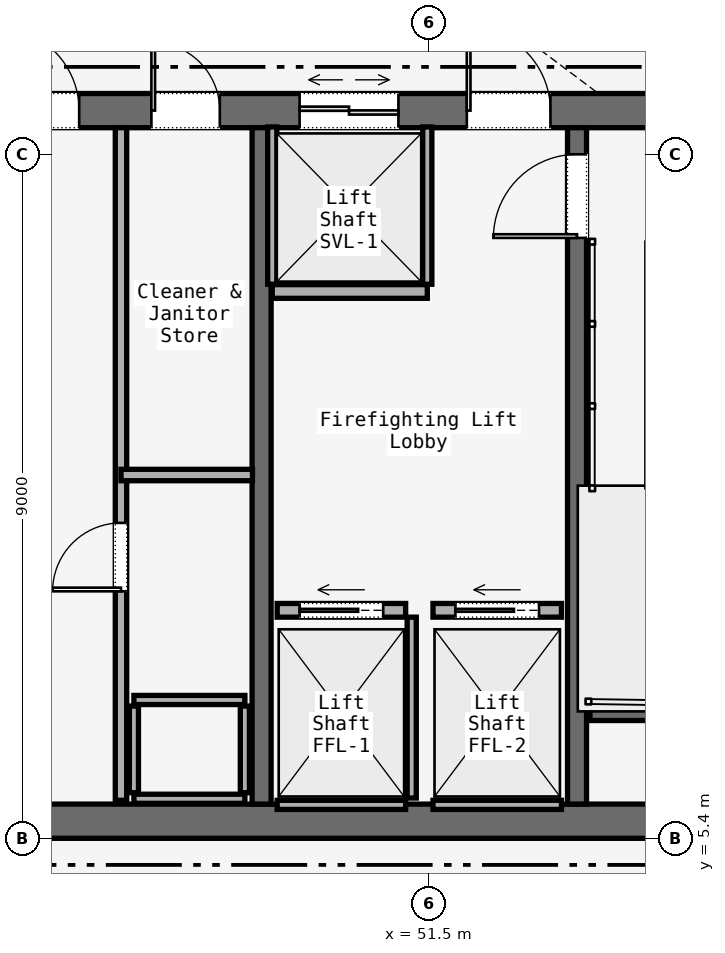
"""IFC4 building model, lengths in metres.
Left out: names, types, materials, properties, quantities, classifications, styles, units other than length and angle.
Written with IfcOpenShell. Run it as: python <this file> out.ifc"""

import sys

from ifc_helpers import new_model, si_unit, direction, frame, frame_2d, origin, place, context, subcontext, project, spatial, rectangle, extrude, element, fill, save


model = new_model("IFC4")
c1 = context("Model", 3, precision=1e-05, world=origin(), true_north=direction((0.0, 1.0)))
c2 = subcontext(c1, "Body", "Model", "MODEL_VIEW")
j1 = project(units=[si_unit("LENGTHUNIT", "METRE"), si_unit("PLANEANGLEUNIT", "RADIAN")], contexts=[c1])
p1 = place(None, origin())
s1 = spatial("IfcSite", under=j1, at=p1, CompositionType="ELEMENT")
p2 = place(p1, origin())
s2 = spatial("IfcBuilding", under=s1, at=p2, CompositionType="ELEMENT")
p3 = place(p2, frame((0.0, 0.0, -9.0)))
s3 = spatial("IfcBuildingStorey", under=s2, at=p3, CompositionType="ELEMENT", Elevation=-9.0)
p4 = place(p3, frame((26.45, 14.975, 0.0), z_axis=(0.0, 0.0, 1.0), x_axis=(1.0, 0.0, 0.0)))
e1 = element("IfcWall", 1, at=p4, inside=s3, PredefinedType="SOLIDWALL", context=c2, shape_type="SweptSolid", body=[
    extrude(rectangle(XDim=31.1, YDim=0.45, at=frame_2d((15.55, 0.0))), origin(), (0.0, 0.0, 1.0), 4.15),
])
p5 = place(p4, frame((1.65, 0.0, 0.0)))
e2 = element("IfcOpeningElement", 2, at=p5, cuts=e1, PredefinedType="OPENING", context=c2, shape_type="SweptSolid", body=[
    extrude(rectangle(XDim=1.1, YDim=2.2, at=frame_2d((0.55, 1.1))), frame((0.0, 0.225, 0.0), z_axis=(0.0, -1.0, 0.0), x_axis=(1.0, 0.0, 0.0)), (0.0, 0.0, 1.0), 0.45),
])
p6 = place(p4, frame((13.65, 0.0, 0.0)))
e3 = element("IfcOpeningElement", 3, at=p6, cuts=e1, PredefinedType="OPENING", context=c2, shape_type="SweptSolid", body=[
    extrude(rectangle(XDim=1.1, YDim=2.2, at=frame_2d((0.55, 1.1))), frame((0.0, 0.225, 0.0), z_axis=(0.0, -1.0, 0.0), x_axis=(1.0, 0.0, 0.0)), (0.0, 0.0, 1.0), 0.45),
])
p7 = place(p4, frame((25.55, 0.0, 0.0)))
e4 = element("IfcOpeningElement", 4, at=p7, cuts=e1, PredefinedType="OPENING", context=c2, shape_type="SweptSolid", body=[
    extrude(rectangle(XDim=1.1, YDim=2.2, at=frame_2d((0.55, 1.1))), frame((0.0, 0.225, 0.0), z_axis=(0.0, -1.0, 0.0), x_axis=(1.0, 0.0, 0.0)), (0.0, 0.0, 1.0), 0.45),
])
p8 = place(p4, frame((10.7, 0.0, 0.0)))
e5 = element("IfcOpeningElement", 5, at=p8, cuts=e1, PredefinedType="OPENING", context=c2, shape_type="SweptSolid", body=[
    extrude(rectangle(XDim=1.4, YDim=2.2, at=frame_2d((0.7, 1.1))), frame((0.0, 0.225, 0.0), z_axis=(0.0, -1.0, 0.0), x_axis=(1.0, 0.0, 0.0)), (0.0, 0.0, 1.0), 0.45),
])
p9 = place(p4, frame((19.35, 0.0, 0.0)))
e6 = element("IfcOpeningElement", 6, at=p9, cuts=e1, PredefinedType="OPENING", context=c2, shape_type="SweptSolid", body=[
    extrude(rectangle(XDim=1.1, YDim=2.2, at=frame_2d((0.55, 1.1))), frame((0.0, 0.225, 0.0), z_axis=(0.0, -1.0, 0.0), x_axis=(1.0, 0.0, 0.0)), (0.0, 0.0, 1.0), 0.45),
])
p10 = place(p4, frame((21.4, 0.0, 0.0)))
e7 = element("IfcOpeningElement", 7, at=p10, cuts=e1, PredefinedType="OPENING", context=c2, shape_type="SweptSolid", body=[
    extrude(rectangle(XDim=0.9, YDim=2.1, at=frame_2d((0.45, 1.05))), frame((0.0, 0.225, 0.0), z_axis=(0.0, -1.0, 0.0), x_axis=(1.0, 0.0, 0.0)), (0.0, 0.0, 1.0), 0.45),
])
p11 = place(p4, frame((23.35, 0.0, 0.0)))
e8 = element("IfcOpeningElement", 8, at=p11, cuts=e1, PredefinedType="OPENING", context=c2, shape_type="SweptSolid", body=[
    extrude(rectangle(XDim=1.3, YDim=2.3, at=frame_2d((0.65, 1.15))), frame((0.0, 0.225, 0.0), z_axis=(0.0, -1.0, 0.0), x_axis=(1.0, 0.0, 0.0)), (0.0, 0.0, 1.0), 0.45),
])
p12 = place(p3, frame((26.45, 5.625, 0.0), z_axis=(0.0, 0.0, 1.0), x_axis=(1.0, 0.0, 0.0)))
e9 = element("IfcWall", 9, at=p12, inside=s3, PredefinedType="SOLIDWALL", context=c2, shape_type="SweptSolid", body=[
    extrude(rectangle(XDim=31.1, YDim=0.45, at=frame_2d((15.55, 0.0))), origin(), (0.0, 0.0, 1.0), 4.15),
])
p13 = place(p3, frame((49.3, 5.85, 0.0), z_axis=(0.0, 0.0, 1.0), x_axis=(0.0, 1.0, 0.0)))
e10 = element("IfcWall", 10, at=p13, inside=s3, PredefinedType="SOLIDWALL", context=c2, shape_type="SweptSolid", body=[
    extrude(rectangle(XDim=8.9, YDim=0.25, at=frame_2d((4.45, 0.0))), origin(), (0.0, 0.0, 1.0), 4.15),
])
p14 = place(p3, frame((53.45, 5.85, 0.0), z_axis=(0.0, 0.0, 1.0), x_axis=(0.0, 1.0, 0.0)))
e11 = element("IfcWall", 11, at=p14, inside=s3, PredefinedType="SOLIDWALL", context=c2, shape_type="SweptSolid", body=[
    extrude(rectangle(XDim=8.9, YDim=0.25, at=frame_2d((4.45, 0.0))), origin(), (0.0, 0.0, 1.0), 4.15),
])
p15 = place(p14, frame((7.45, 0.0, 0.0)))
e12 = element("IfcOpeningElement", 12, at=p15, cuts=e11, PredefinedType="OPENING", context=c2, shape_type="SweptSolid", body=[
    extrude(rectangle(XDim=1.1, YDim=2.2, at=frame_2d((0.55, 1.1))), frame((0.0, 0.125, 0.0), z_axis=(0.0, -1.0, 0.0), x_axis=(1.0, 0.0, 0.0)), (0.0, 0.0, 1.0), 0.25),
])
p16 = place(p3, frame((53.62, 7.05, 0.0), z_axis=(0.0, 0.0, 1.0), x_axis=(1.0, 0.0, 0.0)))
e13 = element("IfcWall", 13, at=p16, inside=s3, PredefinedType="SOLIDWALL", context=c2, shape_type="SweptSolid", body=[
    extrude(rectangle(XDim=3.115, YDim=0.2, at=frame_2d((1.558, 0.0))), origin(), (0.0, 0.0, 1.0), 4.5),
])
for number, where, z_axis, x_axis in (
    (14, (47.62, 5.92, 0.0), (0.0, 0.0, 1.0), (1.0, 0.0, 0.0)),
    (15, (47.62, 7.22, 0.0), (0.0, 0.0, 1.0), (1.0, 0.0, 0.0)),
):
    element("IfcWall", number, at=place(p3, frame(where, z_axis=z_axis, x_axis=x_axis)), inside=s3, PredefinedType="SOLIDWALL", context=c2, shape_type="SweptSolid", body=[
        extrude(rectangle(XDim=1.46, YDim=0.12, at=frame_2d((0.73, 0.0))), origin(), (0.0, 0.0, 1.0), 3.193),
    ])
for number, where, z_axis, x_axis in (
    (16, (47.62, 6.0, 0.0), (0.0, 0.0, 1.0), (0.0, 1.0, 0.0)),
    (17, (49.08, 6.0, 0.0), (0.0, 0.0, 1.0), (0.0, 1.0, 0.0)),
):
    element("IfcWall", number, at=place(p3, frame(where, z_axis=z_axis, x_axis=x_axis)), inside=s3, PredefinedType="SOLIDWALL", context=c2, shape_type="SweptSolid", body=[
        extrude(rectangle(XDim=1.14, YDim=0.12, at=frame_2d((0.57, 0.0))), origin(), (0.0, 0.0, 1.0), 3.193),
    ])
p17 = place(p3, frame((47.45, 5.9, 0.0), z_axis=(0.0, 0.0, 1.0), x_axis=(0.0, 1.0, 0.0)))
e18 = element("IfcWall", 18, at=p17, inside=s3, PredefinedType="PARTITIONING", context=c2, shape_type="SweptSolid", body=[
    extrude(rectangle(XDim=8.85, YDim=0.15, at=frame_2d((4.425, 0.0))), origin(), (0.0, 0.0, 1.0), 3.193),
])
p18 = place(p17, frame((2.75, 0.0, 0.0)))
e19 = element("IfcOpeningElement", 19, at=p18, cuts=e18, PredefinedType="OPENING", context=c2, shape_type="SweptSolid", body=[
    extrude(rectangle(XDim=0.9, YDim=2.1, at=frame_2d((0.45, 1.05))), frame((0.0, 0.075, 0.0), z_axis=(0.0, -1.0, 0.0), x_axis=(1.0, 0.0, 0.0)), (0.0, 0.0, 1.0), 0.15),
])
p19 = place(p3, frame((47.45, 10.18, 0.0), z_axis=(0.0, 0.0, 1.0), x_axis=(1.0, 0.0, 0.0)))
e20 = element("IfcWall", 20, at=p19, inside=s3, PredefinedType="PARTITIONING", context=c2, shape_type="SweptSolid", body=[
    extrude(rectangle(XDim=1.73, YDim=0.15, at=frame_2d((0.865, 0.0))), origin(), (0.0, 0.0, 1.0), 3.193),
])
p20 = place(p3, frame((49.505, 8.4, 0.0), z_axis=(0.0, 0.0, 1.0), x_axis=(1.0, 0.0, 0.0)))
e21 = element("IfcWall", 21, at=p20, inside=s3, PredefinedType="SOLIDWALL", context=c2, shape_type="SweptSolid", body=[
    extrude(rectangle(XDim=1.69, YDim=0.18, at=frame_2d((0.845, 0.0))), origin(), (0.0, 0.0, 1.0), 3.193),
])
p21 = place(p20, frame((0.295, 0.0, 0.0)))
e22 = element("IfcOpeningElement", 22, at=p21, cuts=e21, PredefinedType="OPENING", context=c2, shape_type="SweptSolid", body=[
    extrude(rectangle(XDim=1.1, YDim=2.2, at=frame_2d((0.55, 1.1))), frame((0.0, 0.09, 0.0), z_axis=(0.0, -1.0, 0.0), x_axis=(1.0, 0.0, 0.0)), (0.0, 0.0, 1.0), 0.18),
])
p22 = place(p3, frame((49.505, 5.84, 0.0), z_axis=(0.0, 0.0, 1.0), x_axis=(1.0, 0.0, 0.0)))
e23 = element("IfcWall", 23, at=p22, inside=s3, PredefinedType="SOLIDWALL", context=c2, shape_type="SweptSolid", body=[
    extrude(rectangle(XDim=1.69, YDim=0.12, at=frame_2d((0.845, 0.0))), origin(), (0.0, 0.0, 1.0), 3.193),
])
p23 = place(p3, frame((51.275, 5.93, 0.0), z_axis=(0.0, 0.0, 1.0), x_axis=(0.0, 1.0, 0.0)))
e24 = element("IfcWall", 24, at=p23, inside=s3, PredefinedType="SOLIDWALL", context=c2, shape_type="SweptSolid", body=[
    extrude(rectangle(XDim=2.38, YDim=0.12, at=frame_2d((1.19, 0.0))), origin(), (0.0, 0.0, 1.0), 3.193),
])
p24 = place(p3, frame((51.555, 8.4, 0.0), z_axis=(0.0, 0.0, 1.0), x_axis=(1.0, 0.0, 0.0)))
e25 = element("IfcWall", 25, at=p24, inside=s3, PredefinedType="SOLIDWALL", context=c2, shape_type="SweptSolid", body=[
    extrude(rectangle(XDim=1.69, YDim=0.18, at=frame_2d((0.845, 0.0))), origin(), (0.0, 0.0, 1.0), 3.193),
])
p25 = place(p24, frame((0.295, 0.0, 0.0)))
e26 = element("IfcOpeningElement", 26, at=p25, cuts=e25, PredefinedType="OPENING", context=c2, shape_type="SweptSolid", body=[
    extrude(rectangle(XDim=1.1, YDim=2.2, at=frame_2d((0.55, 1.1))), frame((0.0, 0.09, 0.0), z_axis=(0.0, -1.0, 0.0), x_axis=(1.0, 0.0, 0.0)), (0.0, 0.0, 1.0), 0.18),
])
p26 = place(p3, frame((51.555, 5.84, 0.0), z_axis=(0.0, 0.0, 1.0), x_axis=(1.0, 0.0, 0.0)))
e27 = element("IfcWall", 27, at=p26, inside=s3, PredefinedType="SOLIDWALL", context=c2, shape_type="SweptSolid", body=[
    extrude(rectangle(XDim=1.69, YDim=0.12, at=frame_2d((0.845, 0.0))), origin(), (0.0, 0.0, 1.0), 3.193),
])
p27 = place(p3, frame((49.44, 12.595, 0.0), z_axis=(0.0, 0.0, 1.0), x_axis=(1.0, 0.0, 0.0)))
e28 = element("IfcWall", 28, at=p27, inside=s3, PredefinedType="SOLIDWALL", context=c2, shape_type="SweptSolid", body=[
    extrude(rectangle(XDim=2.04, YDim=0.18, at=frame_2d((1.02, 0.0))), origin(), (0.0, 0.0, 1.0), 3.193),
])
for number, where, z_axis, x_axis in (
    (29, (49.44, 12.69, 0.0), (0.0, 0.0, 1.0), (0.0, 1.0, 0.0)),
    (30, (51.48, 12.69, 0.0), (0.0, 0.0, 1.0), (0.0, 1.0, 0.0)),
):
    element("IfcWall", number, at=place(p3, frame(where, z_axis=z_axis, x_axis=x_axis)), inside=s3, PredefinedType="SOLIDWALL", context=c2, shape_type="SweptSolid", body=[
        extrude(rectangle(XDim=2.07, YDim=0.12, at=frame_2d((1.035, 0.0))), origin(), (0.0, 0.0, 1.0), 3.193),
    ])
p28 = place(p7, origin())
e31 = element("IfcDoor", 31, at=p28, inside=s3, OperationType="SINGLE_SWING_RIGHT", PredefinedType="DOOR", context=c2, shape_type="SweptSolid", body=[
    extrude(rectangle(XDim=1.1, YDim=2.2, at=frame_2d((0.55, 1.1))), frame((0.0, 0.025, 0.0), z_axis=(0.0, -1.0, 0.0), x_axis=(1.0, 0.0, 0.0)), (0.0, 0.0, 1.0), 0.05),
])
fill(e4, e31)
p29 = place(p9, origin())
e32 = element("IfcDoor", 32, at=p29, inside=s3, OperationType="SINGLE_SWING_LEFT", PredefinedType="DOOR", context=c2, shape_type="SweptSolid", body=[
    extrude(rectangle(XDim=1.1, YDim=2.2, at=frame_2d((0.55, 1.1))), frame((0.0, 0.025, 0.0), z_axis=(0.0, -1.0, 0.0), x_axis=(1.0, 0.0, 0.0)), (0.0, 0.0, 1.0), 0.05),
])
fill(e6, e32)
p30 = place(p10, origin())
e33 = element("IfcDoor", 33, at=p30, inside=s3, OperationType="SINGLE_SWING_LEFT", PredefinedType="DOOR", context=c2, shape_type="SweptSolid", body=[
    extrude(rectangle(XDim=0.9, YDim=2.1, at=frame_2d((0.45, 1.05))), frame((0.0, 0.025, 0.0), z_axis=(0.0, -1.0, 0.0), x_axis=(1.0, 0.0, 0.0)), (0.0, 0.0, 1.0), 0.05),
])
fill(e7, e33)
p31 = place(p15, origin())
e34 = element("IfcDoor", 34, at=p31, inside=s3, OperationType="SINGLE_SWING_LEFT", PredefinedType="DOOR", context=c2, shape_type="SweptSolid", body=[
    extrude(rectangle(XDim=1.1, YDim=2.2, at=frame_2d((0.55, 1.1))), frame((0.0, 0.025, 0.0), z_axis=(0.0, -1.0, 0.0), x_axis=(1.0, 0.0, 0.0)), (0.0, 0.0, 1.0), 0.05),
])
fill(e12, e34)
p32 = place(p18, origin())
e35 = element("IfcDoor", 35, at=p32, inside=s3, OperationType="SINGLE_SWING_RIGHT", PredefinedType="DOOR", context=c2, shape_type="SweptSolid", body=[
    extrude(rectangle(XDim=0.9, YDim=2.1, at=frame_2d((0.45, 1.05))), frame((0.0, 0.025, 0.0), z_axis=(0.0, -1.0, 0.0), x_axis=(1.0, 0.0, 0.0)), (0.0, 0.0, 1.0), 0.05),
])
fill(e19, e35)
p33 = place(p21, origin())
e36 = element("IfcDoor", 36, at=p33, inside=s3, OperationType="SLIDING_TO_LEFT", PredefinedType="DOOR", context=c2, shape_type="SweptSolid", body=[
    extrude(rectangle(XDim=1.1, YDim=2.2, at=frame_2d((0.55, 1.1))), frame((0.0, 0.025, 0.0), z_axis=(0.0, -1.0, 0.0), x_axis=(1.0, 0.0, 0.0)), (0.0, 0.0, 1.0), 0.05),
])
fill(e22, e36)
p34 = place(p25, origin())
e37 = element("IfcDoor", 37, at=p34, inside=s3, OperationType="SLIDING_TO_LEFT", PredefinedType="DOOR", context=c2, shape_type="SweptSolid", body=[
    extrude(rectangle(XDim=1.1, YDim=2.2, at=frame_2d((0.55, 1.1))), frame((0.0, 0.025, 0.0), z_axis=(0.0, -1.0, 0.0), x_axis=(1.0, 0.0, 0.0)), (0.0, 0.0, 1.0), 0.05),
])
fill(e26, e37)
p35 = place(p11, origin())
e38 = element("IfcDoor", 38, at=p35, inside=s3, OperationType="DOUBLE_DOOR_SLIDING", PredefinedType="DOOR", context=c2, shape_type="SweptSolid", body=[
    extrude(rectangle(XDim=1.3, YDim=2.3, at=frame_2d((0.65, 1.15))), frame((0.0, 0.025, 0.0), z_axis=(0.0, -1.0, 0.0), x_axis=(1.0, 0.0, 0.0)), (0.0, 0.0, 1.0), 0.05),
])
fill(e8, e38)
save(model, sys.argv[1])
